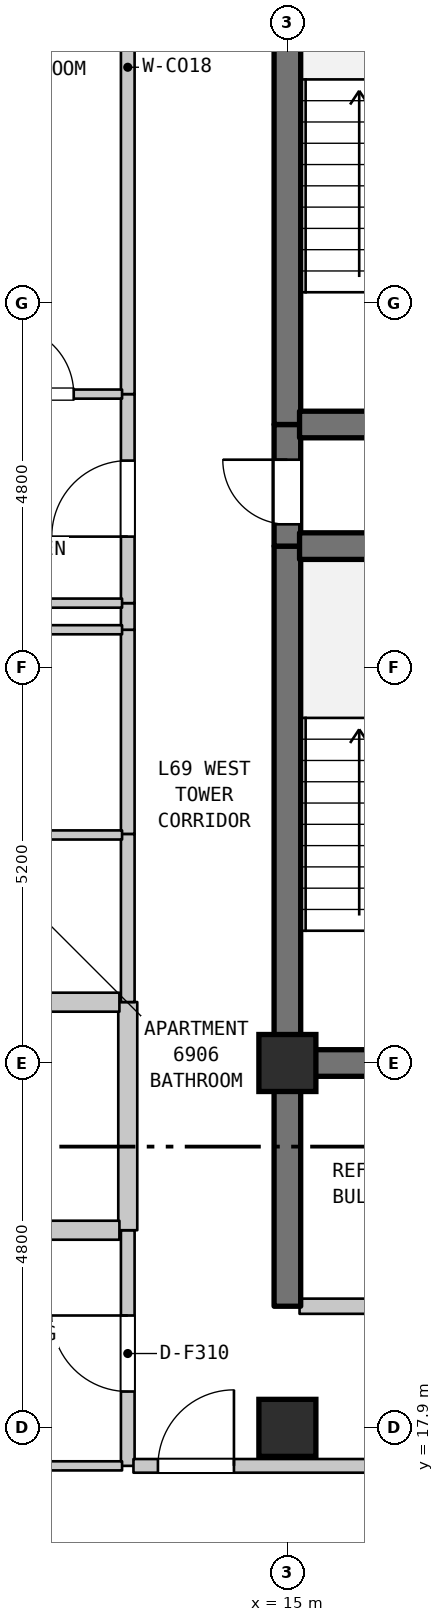
"""IFC4 building model, lengths in metres.
Left out: names, types, materials, properties, quantities, classifications, styles, units other than length and angle.
Written with IfcOpenShell. Run it as: python <this file> out.ifc"""

import sys

from ifc_helpers import new_model, si_unit, direction, frame, frame_2d, origin, origin_2d, place, context, subcontext, project, spatial, rectangle, extrude, element, fill, save


model = new_model("IFC4")
c1 = context("Model", 3, precision=1e-05, world=origin(), true_north=direction((0.0, 1.0)))
c2 = subcontext(c1, "Body", "Model", "MODEL_VIEW")
j1 = project(units=[si_unit("LENGTHUNIT", "METRE"), si_unit("PLANEANGLEUNIT", "RADIAN")], contexts=[c1])
p1 = place(None, origin())
s1 = spatial("IfcSite", under=j1, at=p1, CompositionType="ELEMENT")
p2 = place(p1, origin())
s2 = spatial("IfcBuilding", under=s1, at=p2, CompositionType="ELEMENT")
p3 = place(p2, frame((0.0, 0.0, 276.9)))
s3 = spatial("IfcBuildingStorey", under=s2, at=p3, CompositionType="ELEMENT", Elevation=276.9)
for number, where, z_axis, x_axis in (
    (1, (15.0, 17.9, 0.0), (0.0, 0.0, 1.0), (1.0, 0.0, 0.0)),
    (2, (15.0, 22.7, 0.0), (0.0, 0.0, 1.0), (1.0, 0.0, 0.0)),
):
    element("IfcColumn", number, at=place(p3, frame(where, z_axis=z_axis, x_axis=x_axis)), inside=s3, PredefinedType="COLUMN", context=c2, shape_type="SweptSolid", body=[
        extrude(rectangle(XDim=0.75, YDim=0.75, at=origin_2d()), origin(), (0.0, 0.0, 1.0), 3.7),
    ])
p4 = place(p3, frame((12.9, 17.4, 0.0), z_axis=(0.0, 0.0, 1.0), x_axis=(0.0, 1.0, 0.0)))
e3 = element("IfcWall", 3, at=p4, inside=s3, PredefinedType="STANDARD", context=c2, shape_type="SweptSolid", body=[
    extrude(rectangle(XDim=3.1, YDim=0.18, at=frame_2d((1.55, 0.0))), origin(), (0.0, 0.0, 1.0), 3.39),
])
p5 = place(p4, frame((0.978, 0.0, 0.0)))
e4 = element("IfcOpeningElement", 4, at=p5, cuts=e3, PredefinedType="OPENING", context=c2, shape_type="SweptSolid", body=[
    extrude(rectangle(XDim=1.0, YDim=2.15, at=frame_2d((0.5, 1.075))), frame((0.0, 0.1, 0.0), z_axis=(0.0, -1.0, 0.0), x_axis=(1.0, 0.0, 0.0)), (0.0, 0.0, 1.0), 0.2),
])
p6 = place(p3, frame((12.9, 20.5, 0.0), z_axis=(0.0, 0.0, 1.0), x_axis=(0.0, 1.0, 0.0)))
e5 = element("IfcWall", 5, at=p6, inside=s3, PredefinedType="STANDARD", context=c2, shape_type="SweptSolid", body=[
    extrude(rectangle(XDim=3.002, YDim=0.25, at=frame_2d((1.501, 0.0))), origin(), (0.0, 0.0, 1.0), 3.39),
])
p7 = place(p3, frame((12.9, 23.502, 0.0), z_axis=(0.0, 0.0, 1.0), x_axis=(0.0, 1.0, 0.0)))
e6 = element("IfcWall", 6, at=p7, inside=s3, PredefinedType="STANDARD", context=c2, shape_type="SweptSolid", body=[
    extrude(rectangle(XDim=2.212, YDim=0.18, at=frame_2d((1.106, 0.0))), origin(), (0.0, 0.0, 1.0), 3.39),
])
p8 = place(p3, frame((12.9, 25.714, 0.0), z_axis=(0.0, 0.0, 1.0), x_axis=(0.0, 1.0, 0.0)))
e7 = element("IfcWall", 7, at=p8, inside=s3, PredefinedType="STANDARD", context=c2, shape_type="SweptSolid", body=[
    extrude(rectangle(XDim=2.686, YDim=0.18, at=frame_2d((1.343, 0.0))), origin(), (0.0, 0.0, 1.0), 3.39),
])
p9 = place(p3, frame((12.9, 28.4, 0.0), z_axis=(0.0, 0.0, 1.0), x_axis=(0.0, 1.0, 0.0)))
e8 = element("IfcWall", 8, at=p9, inside=s3, PredefinedType="STANDARD", context=c2, shape_type="SweptSolid", body=[
    extrude(rectangle(XDim=0.35, YDim=0.18, at=frame_2d((0.175, 0.0))), origin(), (0.0, 0.0, 1.0), 3.39),
])
p10 = place(p3, frame((12.9, 28.75, 0.0), z_axis=(0.0, 0.0, 1.0), x_axis=(0.0, 1.0, 0.0)))
e9 = element("IfcWall", 9, at=p10, inside=s3, PredefinedType="STANDARD", context=c2, shape_type="SweptSolid", body=[
    extrude(rectangle(XDim=2.75, YDim=0.18, at=frame_2d((1.375, 0.0))), origin(), (0.0, 0.0, 1.0), 3.39),
])
p11 = place(p10, frame((0.875, 0.0, 0.0)))
e10 = element("IfcOpeningElement", 10, at=p11, cuts=e9, PredefinedType="OPENING", context=c2, shape_type="SweptSolid", body=[
    extrude(rectangle(XDim=1.0, YDim=2.15, at=frame_2d((0.5, 1.075))), frame((0.0, 0.1, 0.0), z_axis=(0.0, -1.0, 0.0), x_axis=(1.0, 0.0, 0.0)), (0.0, 0.0, 1.0), 0.2),
])
p12 = place(p3, frame((12.9, 31.5, 0.0), z_axis=(0.0, 0.0, 1.0), x_axis=(0.0, 1.0, 0.0)))
e11 = element("IfcWall", 11, at=p12, inside=s3, PredefinedType="STANDARD", context=c2, shape_type="SweptSolid", body=[
    extrude(rectangle(XDim=8.6, YDim=0.18, at=frame_2d((4.3, 0.0))), origin(), (0.0, 0.0, 1.0), 3.39),
])
p13 = place(p3, frame((15.0, 19.5, 0.0), z_axis=(0.0, 0.0, 1.0), x_axis=(0.0, 1.0, 0.0)))
e12 = element("IfcWall", 12, at=p13, inside=s3, PredefinedType="SHEAR", context=c2, shape_type="SweptSolid", body=[
    extrude(rectangle(XDim=3.2, YDim=0.35, at=frame_2d((1.6, 0.0))), origin(), (0.0, 0.0, 1.0), 3.39),
])
p14 = place(p3, frame((15.0, 22.7, 0.0), z_axis=(0.0, 0.0, 1.0), x_axis=(0.0, 1.0, 0.0)))
e13 = element("IfcWall", 13, at=p14, inside=s3, PredefinedType="SHEAR", context=c2, shape_type="SweptSolid", body=[
    extrude(rectangle(XDim=6.8, YDim=0.35, at=frame_2d((3.4, 0.0))), origin(), (0.0, 0.0, 1.0), 3.39),
])
p15 = place(p3, frame((15.0, 29.5, 0.0), z_axis=(0.0, 0.0, 1.0), x_axis=(0.0, 1.0, 0.0)))
e14 = element("IfcWall", 14, at=p15, inside=s3, PredefinedType="SHEAR", context=c2, shape_type="SweptSolid", body=[
    extrude(rectangle(XDim=1.6, YDim=0.35, at=frame_2d((0.8, 0.0))), origin(), (0.0, 0.0, 1.0), 3.39),
])
p16 = place(p15, frame((0.287, 0.0, 0.0)))
e15 = element("IfcOpeningElement", 15, at=p16, cuts=e14, PredefinedType="OPENING", context=c2, shape_type="SweptSolid", body=[
    extrude(rectangle(XDim=0.85, YDim=2.1, at=frame_2d((0.425, 1.05))), frame((0.0, 0.185, 0.0), z_axis=(0.0, -1.0, 0.0), x_axis=(1.0, 0.0, 0.0)), (0.0, 0.0, 1.0), 0.37),
])
p17 = place(p3, frame((15.0, 31.1, 0.0), z_axis=(0.0, 0.0, 1.0), x_axis=(0.0, 1.0, 0.0)))
e16 = element("IfcWall", 16, at=p17, inside=s3, PredefinedType="SHEAR", context=c2, shape_type="SweptSolid", body=[
    extrude(rectangle(XDim=6.8, YDim=0.35, at=frame_2d((3.4, 0.0))), origin(), (0.0, 0.0, 1.0), 3.39),
])
p18 = place(p3, frame((8.973, 17.4, 0.0), z_axis=(0.0, 0.0, 1.0), x_axis=(1.0, 0.0, 0.0)))
e17 = element("IfcWall", 17, at=p18, inside=s3, PredefinedType="PARTITIONING", context=c2, shape_type="SweptSolid", body=[
    extrude(rectangle(XDim=3.852, YDim=0.12, at=frame_2d((1.926, 0.0))), origin(), (0.0, 0.0, 1.0), 3.39),
])
p19 = place(p3, frame((12.975, 17.4, 0.0), z_axis=(0.0, 0.0, 1.0), x_axis=(1.0, 0.0, 0.0)))
e18 = element("IfcWall", 18, at=p19, inside=s3, PredefinedType="STANDARD", context=c2, shape_type="SweptSolid", body=[
    extrude(rectangle(XDim=3.68, YDim=0.18, at=frame_2d((1.84, 0.0))), origin(), (0.0, 0.0, 1.0), 3.39),
])
p20 = place(p19, frame((0.322, 0.0, 0.0)))
e19 = element("IfcOpeningElement", 19, at=p20, cuts=e18, PredefinedType="OPENING", context=c2, shape_type="SweptSolid", body=[
    extrude(rectangle(XDim=1.0, YDim=2.15, at=frame_2d((0.5, 1.075))), frame((0.0, 0.1, 0.0), z_axis=(0.0, -1.0, 0.0), x_axis=(1.0, 0.0, 0.0)), (0.0, 0.0, 1.0), 0.2),
])
p21 = place(p3, frame((15.16, 19.5, 0.0), z_axis=(0.0, 0.0, 1.0), x_axis=(1.0, 0.0, 0.0)))
e20 = element("IfcWall", 20, at=p21, inside=s3, PredefinedType="STANDARD", context=c2, shape_type="SweptSolid", body=[
    extrude(rectangle(XDim=3.68, YDim=0.2, at=frame_2d((1.84, 0.0))), origin(), (0.0, 0.0, 1.0), 3.39),
])
p22 = place(p21, frame((1.39, 0.0, 0.0)))
e21 = element("IfcOpeningElement", 21, at=p22, cuts=e20, PredefinedType="OPENING", context=c2, shape_type="SweptSolid", body=[
    extrude(rectangle(XDim=0.9, YDim=2.15, at=frame_2d((0.45, 1.075))), frame((0.0, 0.11, 0.0), z_axis=(0.0, -1.0, 0.0), x_axis=(1.0, 0.0, 0.0)), (0.0, 0.0, 1.0), 0.22),
])
p23 = place(p3, frame((10.76, 20.5, 0.0), z_axis=(0.0, 0.0, 1.0), x_axis=(1.0, 0.0, 0.0)))
e22 = element("IfcWall", 22, at=p23, inside=s3, PredefinedType="STANDARD", context=c2, shape_type="SweptSolid", body=[
    extrude(rectangle(XDim=2.03, YDim=0.25, at=frame_2d((1.015, 0.0))), origin(), (0.0, 0.0, 1.0), 3.39),
])
p24 = place(p3, frame((15.16, 22.7, 0.0), z_axis=(0.0, 0.0, 1.0), x_axis=(1.0, 0.0, 0.0)))
e23 = element("IfcWall", 23, at=p24, inside=s3, PredefinedType="SHEAR", context=c2, shape_type="SweptSolid", body=[
    extrude(rectangle(XDim=3.68, YDim=0.35, at=frame_2d((1.84, 0.0))), origin(), (0.0, 0.0, 1.0), 3.39),
])
p25 = place(p3, frame((10.76, 23.5, 0.0), z_axis=(0.0, 0.0, 1.0), x_axis=(1.0, 0.0, 0.0)))
e24 = element("IfcWall", 24, at=p25, inside=s3, PredefinedType="STANDARD", context=c2, shape_type="SweptSolid", body=[
    extrude(rectangle(XDim=2.03, YDim=0.25, at=frame_2d((1.015, 0.0))), origin(), (0.0, 0.0, 1.0), 3.39),
])
for number, where, z_axis, x_axis in (
    (25, (10.695, 25.7, 0.0), (0.0, 0.0, 1.0), (1.0, 0.0, 0.0)),
    (26, (10.695, 28.4, 0.0), (0.0, 0.0, 1.0), (1.0, 0.0, 0.0)),
):
    element("IfcWall", number, at=place(p3, frame(where, z_axis=z_axis, x_axis=x_axis)), inside=s3, PredefinedType="PARTITIONING", context=c2, shape_type="SweptSolid", body=[
        extrude(rectangle(XDim=2.13, YDim=0.12, at=frame_2d((1.065, 0.0))), origin(), (0.0, 0.0, 1.0), 3.39),
    ])
p26 = place(p3, frame((9.175, 28.75, 0.0), z_axis=(0.0, 0.0, 1.0), x_axis=(1.0, 0.0, 0.0)))
e27 = element("IfcWall", 27, at=p26, inside=s3, PredefinedType="PARTITIONING", context=c2, shape_type="SweptSolid", body=[
    extrude(rectangle(XDim=3.65, YDim=0.12, at=frame_2d((1.825, 0.0))), origin(), (0.0, 0.0, 1.0), 3.39),
])
for number, where, z_axis, x_axis in (
    (28, (15.16, 29.5, 0.0), (0.0, 0.0, 1.0), (1.0, 0.0, 0.0)),
    (29, (15.16, 31.1, 0.0), (0.0, 0.0, 1.0), (1.0, 0.0, 0.0)),
):
    element("IfcWall", number, at=place(p3, frame(where, z_axis=z_axis, x_axis=x_axis)), inside=s3, PredefinedType="SHEAR", context=c2, shape_type="SweptSolid", body=[
        extrude(rectangle(XDim=3.68, YDim=0.35, at=frame_2d((1.84, 0.0))), origin(), (0.0, 0.0, 1.0), 3.39),
    ])
p27 = place(p3, frame((10.623, 31.5, 0.0), z_axis=(0.0, 0.0, 1.0), x_axis=(1.0, 0.0, 0.0)))
e30 = element("IfcWall", 30, at=p27, inside=s3, PredefinedType="PARTITIONING", context=c2, shape_type="SweptSolid", body=[
    extrude(rectangle(XDim=2.202, YDim=0.12, at=frame_2d((1.101, 0.0))), origin(), (0.0, 0.0, 1.0), 3.39),
])
p28 = place(p27, frame((0.666, 0.0, 0.0)))
e31 = element("IfcOpeningElement", 31, at=p28, cuts=e30, PredefinedType="OPENING", context=c2, shape_type="SweptSolid", body=[
    extrude(rectangle(XDim=0.9, YDim=2.1, at=frame_2d((0.45, 1.05))), frame((0.0, 0.07, 0.0), z_axis=(0.0, -1.0, 0.0), x_axis=(1.0, 0.0, 0.0)), (0.0, 0.0, 1.0), 0.14),
])
p29 = place(p5, origin())
e32 = element("IfcDoor", 32, at=p29, inside=s3, OperationType="SINGLE_SWING_RIGHT", PredefinedType="DOOR", context=c2, shape_type="SweptSolid", body=[
    extrude(rectangle(XDim=1.0, YDim=2.15, at=frame_2d((0.5, 1.075))), frame((0.0, 0.025, 0.0), z_axis=(0.0, -1.0, 0.0), x_axis=(1.0, 0.0, 0.0)), (0.0, 0.0, 1.0), 0.05),
])
fill(e4, e32)
p30 = place(p11, origin())
e33 = element("IfcDoor", 33, at=p30, inside=s3, OperationType="SINGLE_SWING_LEFT", PredefinedType="DOOR", context=c2, shape_type="SweptSolid", body=[
    extrude(rectangle(XDim=1.0, YDim=2.15, at=frame_2d((0.5, 1.075))), frame((0.0, 0.025, 0.0), z_axis=(0.0, -1.0, 0.0), x_axis=(1.0, 0.0, 0.0)), (0.0, 0.0, 1.0), 0.05),
])
fill(e10, e33)
p31 = place(p16, origin())
e34 = element("IfcDoor", 34, at=p31, inside=s3, OperationType="SINGLE_SWING_RIGHT", PredefinedType="DOOR", context=c2, shape_type="SweptSolid", body=[
    extrude(rectangle(XDim=0.85, YDim=2.1, at=frame_2d((0.425, 1.05))), frame((0.0, 0.025, 0.0), z_axis=(0.0, -1.0, 0.0), x_axis=(1.0, 0.0, 0.0)), (0.0, 0.0, 1.0), 0.05),
])
fill(e15, e34)
p32 = place(p20, origin())
e35 = element("IfcDoor", 35, at=p32, inside=s3, OperationType="SINGLE_SWING_RIGHT", PredefinedType="DOOR", context=c2, shape_type="SweptSolid", body=[
    extrude(rectangle(XDim=1.0, YDim=2.15, at=frame_2d((0.5, 1.075))), frame((0.0, 0.025, 0.0), z_axis=(0.0, -1.0, 0.0), x_axis=(1.0, 0.0, 0.0)), (0.0, 0.0, 1.0), 0.05),
])
fill(e19, e35)
p33 = place(p28, origin())
e36 = element("IfcDoor", 36, at=p33, inside=s3, OperationType="SINGLE_SWING_LEFT", PredefinedType="DOOR", context=c2, shape_type="SweptSolid", body=[
    extrude(rectangle(XDim=0.9, YDim=2.1, at=frame_2d((0.45, 1.05))), frame((0.0, 0.025, 0.0), z_axis=(0.0, -1.0, 0.0), x_axis=(1.0, 0.0, 0.0)), (0.0, 0.0, 1.0), 0.05),
])
fill(e31, e36)
save(model, sys.argv[1])
